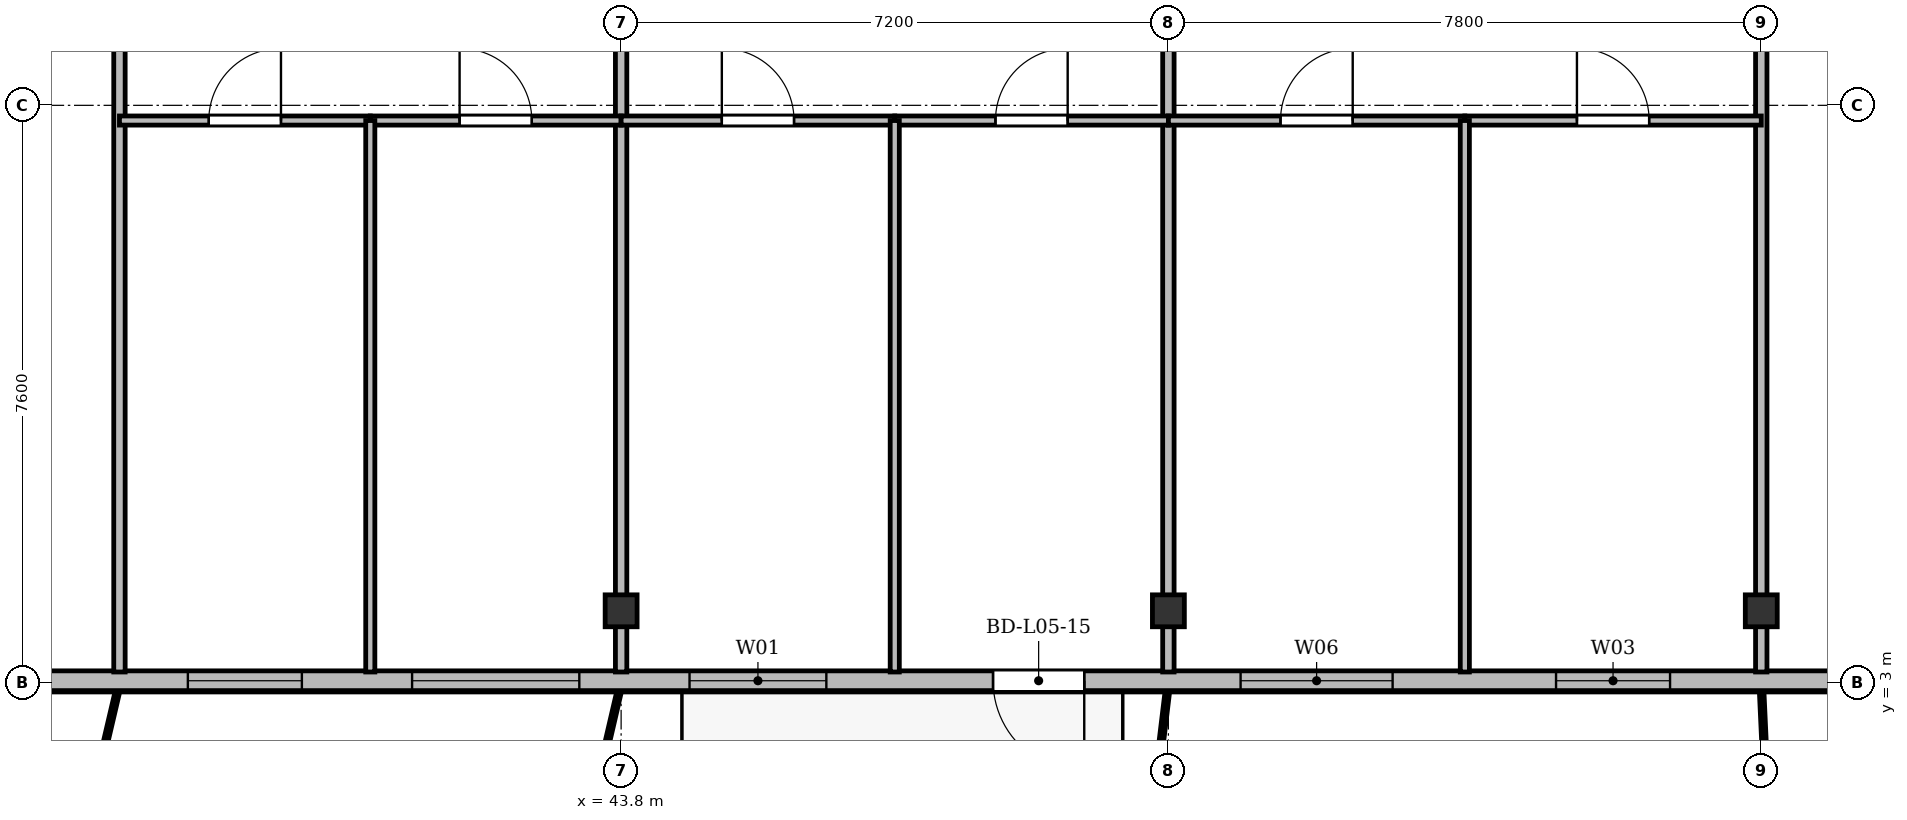
"""IFC4 building model, lengths in metres.
Left out: names, types, materials, properties, quantities, classifications, styles, units other than length and angle.
Written with IfcOpenShell. Run it as: python <this file> out.ifc"""

import sys

from ifc_helpers import new_model, si_unit, direction, frame, frame_2d, origin, origin_2d, place, context, subcontext, project, spatial, rectangle, i_section, extrude, source, transform, mapped, element, fill, save


model = new_model("IFC4")
c1 = context("Model", 3, precision=1e-05, world=origin(), true_north=direction((0.0, 1.0)))
c2 = subcontext(c1, "Body", "Model", "MODEL_VIEW")
j1 = project(units=[si_unit("LENGTHUNIT", "METRE"), si_unit("PLANEANGLEUNIT", "RADIAN")], contexts=[c1])
p1 = place(None, origin())
s1 = spatial("IfcSite", under=j1, at=p1, CompositionType="ELEMENT")
p2 = place(p1, origin())
s2 = spatial("IfcBuilding", under=s1, at=p2, CompositionType="ELEMENT")
p3 = place(p2, frame((0.0, 0.0, 23.5)))
s3 = spatial("IfcBuildingStorey", under=s2, at=p3, CompositionType="ELEMENT", Elevation=23.5)
m1 = source(origin(), c2, "Body", "SweptSolid", [
    extrude(i_section(OverallWidth=0.42, OverallDepth=0.42, WebThickness=0.026, FlangeThickness=0.04, at=origin_2d()), origin(), (0.0, 0.0, 1.0), 3.6),
])
for number, where, z_axis, x_axis in (
    (1, (43.8, 3.95, 0.0), (0.0, 0.0, 1.0), (1.0, 0.0, 0.0)),
    (2, (51.0, 3.95, 0.0), (0.0, 0.0, 1.0), (1.0, 0.0, 0.0)),
    (3, (58.8, 3.95, 0.0), (0.0, 0.0, 1.0), (1.0, 0.0, 0.0)),
):
    element("IfcColumn", number, at=place(p3, frame(where, z_axis=z_axis, x_axis=x_axis)), inside=s3, PredefinedType="COLUMN", context=c2, shape_type="MappedRepresentation", body=[
        mapped(m1, transform((0.0, 0.0, 0.0), x_axis=(1.0, 0.0, 0.0), y_axis=(0.0, 1.0, 0.0), z_axis=(0.0, 0.0, 1.0), scale=1.0)),
    ])
p4 = place(p3, frame((66.9, 3.03, 0.0), z_axis=(0.0, 0.0, 1.0), x_axis=(-1.0, 0.0, 0.0)))
e4 = element("IfcWall", 4, at=p4, inside=s3, PredefinedType="SOLIDWALL", context=c2, shape_type="SweptSolid", body=[
    extrude(rectangle(XDim=59.4, YDim=0.26, at=frame_2d((29.7, 0.0))), origin(), (0.0, 0.0, 1.0), 3.34),
])
p5 = place(p4, frame((3.6, 0.0, 0.9)))
e5 = element("IfcOpeningElement", 5, at=p5, cuts=e4, PredefinedType="OPENING", context=c2, shape_type="SweptSolid", body=[
    extrude(rectangle(XDim=2.2, YDim=1.8, at=frame_2d((1.1, 0.9))), frame((0.0, 0.14, 0.0), z_axis=(0.0, -1.0, 0.0), x_axis=(1.0, 0.0, 0.0)), (0.0, 0.0, 1.0), 0.28),
])
p6 = place(p4, frame((9.3, 0.0, 0.9)))
e6 = element("IfcOpeningElement", 6, at=p6, cuts=e4, PredefinedType="OPENING", context=c2, shape_type="SweptSolid", body=[
    extrude(rectangle(XDim=1.5, YDim=1.75, at=frame_2d((0.75, 0.875))), frame((0.0, 0.14, 0.0), z_axis=(0.0, -1.0, 0.0), x_axis=(1.0, 0.0, 0.0)), (0.0, 0.0, 1.0), 0.28),
])
p7 = place(p4, frame((12.95, 0.0, 0.9)))
e7 = element("IfcOpeningElement", 7, at=p7, cuts=e4, PredefinedType="OPENING", context=c2, shape_type="SweptSolid", body=[
    extrude(rectangle(XDim=2.0, YDim=1.95, at=frame_2d((1.0, 0.975))), frame((0.0, 0.14, 0.0), z_axis=(0.0, -1.0, 0.0), x_axis=(1.0, 0.0, 0.0)), (0.0, 0.0, 1.0), 0.28),
])
p8 = place(p4, frame((17.007, 0.0, 0.0)))
e8 = element("IfcOpeningElement", 8, at=p8, cuts=e4, PredefinedType="OPENING", context=c2, shape_type="SweptSolid", body=[
    extrude(rectangle(XDim=1.2, YDim=2.2, at=frame_2d((0.6, 1.1))), frame((0.0, 0.14, 0.0), z_axis=(0.0, -1.0, 0.0), x_axis=(1.0, 0.0, 0.0)), (0.0, 0.0, 1.0), 0.28),
])
p9 = place(p4, frame((20.4, 0.0, 0.9)))
e9 = element("IfcOpeningElement", 9, at=p9, cuts=e4, PredefinedType="OPENING", context=c2, shape_type="SweptSolid", body=[
    extrude(rectangle(XDim=1.8, YDim=1.8, at=frame_2d((0.9, 0.9))), frame((0.0, 0.14, 0.0), z_axis=(0.0, -1.0, 0.0), x_axis=(1.0, 0.0, 0.0)), (0.0, 0.0, 1.0), 0.28),
])
p10 = place(p4, frame((23.65, 0.0, 0.9)))
e10 = element("IfcOpeningElement", 10, at=p10, cuts=e4, PredefinedType="OPENING", context=c2, shape_type="SweptSolid", body=[
    extrude(rectangle(XDim=2.2, YDim=1.8, at=frame_2d((1.1, 0.9))), frame((0.0, 0.14, 0.0), z_axis=(0.0, -1.0, 0.0), x_axis=(1.0, 0.0, 0.0)), (0.0, 0.0, 1.0), 0.28),
])
p11 = place(p4, frame((27.3, 0.0, 0.9)))
e11 = element("IfcOpeningElement", 11, at=p11, cuts=e4, PredefinedType="OPENING", context=c2, shape_type="SweptSolid", body=[
    extrude(rectangle(XDim=1.5, YDim=1.75, at=frame_2d((0.75, 0.875))), frame((0.0, 0.14, 0.0), z_axis=(0.0, -1.0, 0.0), x_axis=(1.0, 0.0, 0.0)), (0.0, 0.0, 1.0), 0.28),
])
p12 = place(p4, frame((32.0, 0.0, 0.9)))
e12 = element("IfcOpeningElement", 12, at=p12, cuts=e4, PredefinedType="OPENING", context=c2, shape_type="SweptSolid", body=[
    extrude(rectangle(XDim=2.0, YDim=1.95, at=frame_2d((1.0, 0.975))), frame((0.0, 0.14, 0.0), z_axis=(0.0, -1.0, 0.0), x_axis=(1.0, 0.0, 0.0)), (0.0, 0.0, 1.0), 0.28),
])
p13 = place(p4, frame((36.675, 0.0, 0.9)))
e13 = element("IfcOpeningElement", 13, at=p13, cuts=e4, PredefinedType="OPENING", context=c2, shape_type="SweptSolid", body=[
    extrude(rectangle(XDim=1.65, YDim=1.85, at=frame_2d((0.825, 0.925))), frame((0.0, 0.14, 0.0), z_axis=(0.0, -1.0, 0.0), x_axis=(1.0, 0.0, 0.0)), (0.0, 0.0, 1.0), 0.28),
])
p14 = place(p4, frame((39.0, 0.0, 0.9)))
e14 = element("IfcOpeningElement", 14, at=p14, cuts=e4, PredefinedType="OPENING", context=c2, shape_type="SweptSolid", body=[
    extrude(rectangle(XDim=1.8, YDim=1.8, at=frame_2d((0.9, 0.9))), frame((0.0, 0.14, 0.0), z_axis=(0.0, -1.0, 0.0), x_axis=(1.0, 0.0, 0.0)), (0.0, 0.0, 1.0), 0.28),
])
p15 = place(p4, frame((41.55, 0.0, 0.9)))
e15 = element("IfcOpeningElement", 15, at=p15, cuts=e4, PredefinedType="OPENING", context=c2, shape_type="SweptSolid", body=[
    extrude(rectangle(XDim=1.5, YDim=1.75, at=frame_2d((0.75, 0.875))), frame((0.0, 0.14, 0.0), z_axis=(0.0, -1.0, 0.0), x_axis=(1.0, 0.0, 0.0)), (0.0, 0.0, 1.0), 0.28),
])
p16 = place(p4, frame((45.435, 0.0, 0.0)))
e16 = element("IfcOpeningElement", 16, at=p16, cuts=e4, PredefinedType="OPENING", context=c2, shape_type="SweptSolid", body=[
    extrude(rectangle(XDim=1.2, YDim=2.2, at=frame_2d((0.6, 1.1))), frame((0.0, 0.14, 0.0), z_axis=(0.0, -1.0, 0.0), x_axis=(1.0, 0.0, 0.0)), (0.0, 0.0, 1.0), 0.28),
])
p17 = place(p4, frame((48.35, 0.0, 0.9)))
e17 = element("IfcOpeningElement", 17, at=p17, cuts=e4, PredefinedType="OPENING", context=c2, shape_type="SweptSolid", body=[
    extrude(rectangle(XDim=2.0, YDim=1.95, at=frame_2d((1.0, 0.975))), frame((0.0, 0.14, 0.0), z_axis=(0.0, -1.0, 0.0), x_axis=(1.0, 0.0, 0.0)), (0.0, 0.0, 1.0), 0.28),
])
p18 = place(p4, frame((52.175, 0.0, 0.9)))
e18 = element("IfcOpeningElement", 18, at=p18, cuts=e4, PredefinedType="OPENING", context=c2, shape_type="SweptSolid", body=[
    extrude(rectangle(XDim=1.65, YDim=1.85, at=frame_2d((0.825, 0.925))), frame((0.0, 0.14, 0.0), z_axis=(0.0, -1.0, 0.0), x_axis=(1.0, 0.0, 0.0)), (0.0, 0.0, 1.0), 0.28),
])
p19 = place(p4, frame((55.5, 0.0, 0.9)))
e19 = element("IfcOpeningElement", 19, at=p19, cuts=e4, PredefinedType="OPENING", context=c2, shape_type="SweptSolid", body=[
    extrude(rectangle(XDim=1.8, YDim=1.8, at=frame_2d((0.9, 0.9))), frame((0.0, 0.14, 0.0), z_axis=(0.0, -1.0, 0.0), x_axis=(1.0, 0.0, 0.0)), (0.0, 0.0, 1.0), 0.28),
])
p20 = place(p3, frame((37.2, 3.145, 0.0), z_axis=(0.0, 0.0, 1.0), x_axis=(0.0, 1.0, 0.0)))
e20 = element("IfcWall", 20, at=p20, inside=s3, PredefinedType="PARTITIONING", context=c2, shape_type="SweptSolid", body=[
    extrude(rectangle(XDim=24.455, YDim=0.15, at=frame_2d((12.228, 0.0))), origin(), (0.0, 0.0, 1.0), 2.69),
])
for number, where, z_axis, x_axis in (
    (21, (43.8, 3.145, 0.0), (0.0, 0.0, 1.0), (0.0, 1.0, 0.0)),
    (22, (51.0, 3.145, 0.0), (0.0, 0.0, 1.0), (0.0, 1.0, 0.0)),
    (23, (58.8, 3.145, 0.0), (0.0, 0.0, 1.0), (0.0, 1.0, 0.0)),
):
    element("IfcWall", number, at=place(p3, frame(where, z_axis=z_axis, x_axis=x_axis)), inside=s3, PredefinedType="PARTITIONING", context=c2, shape_type="SweptSolid", body=[
        extrude(rectangle(XDim=24.455, YDim=0.15, at=frame_2d((12.228, 0.0))), origin(), (0.0, 0.0, 1.0), 2.752),
    ])
p21 = place(p3, frame((37.2, 10.4, 0.0), z_axis=(0.0, 0.0, 1.0), x_axis=(1.0, 0.0, 0.0)))
e24 = element("IfcWall", 24, at=p21, inside=s3, PredefinedType="PARTITIONING", context=c2, shape_type="SweptSolid", body=[
    extrude(rectangle(XDim=3.3, YDim=0.12, at=frame_2d((1.65, 0.0))), origin(), (0.0, 0.0, 1.0), 3.34),
])
p22 = place(p21, frame((1.175, 0.0, 0.0)))
e25 = element("IfcOpeningElement", 25, at=p22, cuts=e24, PredefinedType="OPENING", context=c2, shape_type="SweptSolid", body=[
    extrude(rectangle(XDim=0.95, YDim=2.15, at=frame_2d((0.475, 1.075))), frame((0.0, 0.07, 0.0), z_axis=(0.0, -1.0, 0.0), x_axis=(1.0, 0.0, 0.0)), (0.0, 0.0, 1.0), 0.14),
])
p23 = place(p3, frame((40.5, 10.4, 0.0), z_axis=(0.0, 0.0, 1.0), x_axis=(1.0, 0.0, 0.0)))
e26 = element("IfcWall", 26, at=p23, inside=s3, PredefinedType="PARTITIONING", context=c2, shape_type="SweptSolid", body=[
    extrude(rectangle(XDim=3.3, YDim=0.12, at=frame_2d((1.65, 0.0))), origin(), (0.0, 0.0, 1.0), 2.752),
])
p24 = place(p23, frame((1.175, 0.0, 0.0)))
e27 = element("IfcOpeningElement", 27, at=p24, cuts=e26, PredefinedType="OPENING", context=c2, shape_type="SweptSolid", body=[
    extrude(rectangle(XDim=0.95, YDim=2.15, at=frame_2d((0.475, 1.075))), frame((0.0, 0.07, 0.0), z_axis=(0.0, -1.0, 0.0), x_axis=(1.0, 0.0, 0.0)), (0.0, 0.0, 1.0), 0.14),
])
p25 = place(p3, frame((40.5, 3.145, 0.0), z_axis=(0.0, 0.0, 1.0), x_axis=(0.0, 1.0, 0.0)))
e28 = element("IfcWall", 28, at=p25, inside=s3, PredefinedType="PARTITIONING", context=c2, shape_type="SweptSolid", body=[
    extrude(rectangle(XDim=7.255, YDim=0.12, at=frame_2d((3.627, 0.0))), origin(), (0.0, 0.0, 1.0), 2.69),
])
p26 = place(p3, frame((43.8, 10.4, 0.0), z_axis=(0.0, 0.0, 1.0), x_axis=(1.0, 0.0, 0.0)))
e29 = element("IfcWall", 29, at=p26, inside=s3, PredefinedType="PARTITIONING", context=c2, shape_type="SweptSolid", body=[
    extrude(rectangle(XDim=3.6, YDim=0.12, at=frame_2d((1.8, 0.0))), origin(), (0.0, 0.0, 1.0), 2.752),
])
p27 = place(p26, frame((1.325, 0.0, 0.0)))
e30 = element("IfcOpeningElement", 30, at=p27, cuts=e29, PredefinedType="OPENING", context=c2, shape_type="SweptSolid", body=[
    extrude(rectangle(XDim=0.95, YDim=2.15, at=frame_2d((0.475, 1.075))), frame((0.0, 0.07, 0.0), z_axis=(0.0, -1.0, 0.0), x_axis=(1.0, 0.0, 0.0)), (0.0, 0.0, 1.0), 0.14),
])
p28 = place(p3, frame((47.4, 10.4, 0.0), z_axis=(0.0, 0.0, 1.0), x_axis=(1.0, 0.0, 0.0)))
e31 = element("IfcWall", 31, at=p28, inside=s3, PredefinedType="PARTITIONING", context=c2, shape_type="SweptSolid", body=[
    extrude(rectangle(XDim=3.6, YDim=0.12, at=frame_2d((1.8, 0.0))), origin(), (0.0, 0.0, 1.0), 2.752),
])
p29 = place(p28, frame((1.325, 0.0, 0.0)))
e32 = element("IfcOpeningElement", 32, at=p29, cuts=e31, PredefinedType="OPENING", context=c2, shape_type="SweptSolid", body=[
    extrude(rectangle(XDim=0.95, YDim=2.15, at=frame_2d((0.475, 1.075))), frame((0.0, 0.07, 0.0), z_axis=(0.0, -1.0, 0.0), x_axis=(1.0, 0.0, 0.0)), (0.0, 0.0, 1.0), 0.14),
])
p30 = place(p3, frame((47.4, 3.145, 0.0), z_axis=(0.0, 0.0, 1.0), x_axis=(0.0, 1.0, 0.0)))
e33 = element("IfcWall", 33, at=p30, inside=s3, PredefinedType="PARTITIONING", context=c2, shape_type="SweptSolid", body=[
    extrude(rectangle(XDim=7.255, YDim=0.12, at=frame_2d((3.627, 0.0))), origin(), (0.0, 0.0, 1.0), 2.69),
])
p31 = place(p3, frame((51.0, 10.4, 0.0), z_axis=(0.0, 0.0, 1.0), x_axis=(1.0, 0.0, 0.0)))
e34 = element("IfcWall", 34, at=p31, inside=s3, PredefinedType="PARTITIONING", context=c2, shape_type="SweptSolid", body=[
    extrude(rectangle(XDim=3.9, YDim=0.12, at=frame_2d((1.95, 0.0))), origin(), (0.0, 0.0, 1.0), 2.752),
])
p32 = place(p31, frame((1.475, 0.0, 0.0)))
e35 = element("IfcOpeningElement", 35, at=p32, cuts=e34, PredefinedType="OPENING", context=c2, shape_type="SweptSolid", body=[
    extrude(rectangle(XDim=0.95, YDim=2.15, at=frame_2d((0.475, 1.075))), frame((0.0, 0.07, 0.0), z_axis=(0.0, -1.0, 0.0), x_axis=(1.0, 0.0, 0.0)), (0.0, 0.0, 1.0), 0.14),
])
p33 = place(p3, frame((54.9, 10.4, 0.0), z_axis=(0.0, 0.0, 1.0), x_axis=(1.0, 0.0, 0.0)))
e36 = element("IfcWall", 36, at=p33, inside=s3, PredefinedType="PARTITIONING", context=c2, shape_type="SweptSolid", body=[
    extrude(rectangle(XDim=3.9, YDim=0.12, at=frame_2d((1.95, 0.0))), origin(), (0.0, 0.0, 1.0), 2.752),
])
p34 = place(p33, frame((1.475, 0.0, 0.0)))
e37 = element("IfcOpeningElement", 37, at=p34, cuts=e36, PredefinedType="OPENING", context=c2, shape_type="SweptSolid", body=[
    extrude(rectangle(XDim=0.95, YDim=2.15, at=frame_2d((0.475, 1.075))), frame((0.0, 0.07, 0.0), z_axis=(0.0, -1.0, 0.0), x_axis=(1.0, 0.0, 0.0)), (0.0, 0.0, 1.0), 0.14),
])
p35 = place(p3, frame((54.9, 3.145, 0.0), z_axis=(0.0, 0.0, 1.0), x_axis=(0.0, 1.0, 0.0)))
e38 = element("IfcWall", 38, at=p35, inside=s3, PredefinedType="PARTITIONING", context=c2, shape_type="SweptSolid", body=[
    extrude(rectangle(XDim=7.255, YDim=0.12, at=frame_2d((3.627, 0.0))), origin(), (0.0, 0.0, 1.0), 2.69),
])
m2 = source(origin(), c2, "Body", "SweptSolid", [
    extrude(rectangle(XDim=1.5, YDim=1.75, at=frame_2d((0.75, 0.875))), frame((0.0, 0.03, 0.0), z_axis=(0.0, -1.0, 0.0), x_axis=(1.0, 0.0, 0.0)), (0.0, 0.0, 1.0), 0.06),
])
p36 = place(p6, origin())
e39 = element("IfcWindow", 39, at=p36, inside=s3, PartitioningType="SINGLE_PANEL", PredefinedType="WINDOW", context=c2, shape_type="MappedRepresentation", body=[
    mapped(m2, transform((0.0, 0.0, 0.0), x_axis=(1.0, 0.0, 0.0), y_axis=(0.0, 1.0, 0.0), z_axis=(0.0, 0.0, 1.0), scale=1.0)),
])
fill(e6, e39)
m3 = source(origin(), c2, "Body", "SweptSolid", [
    extrude(rectangle(XDim=2.0, YDim=1.95, at=frame_2d((1.0, 0.975))), frame((0.0, 0.03, 0.0), z_axis=(0.0, -1.0, 0.0), x_axis=(1.0, 0.0, 0.0)), (0.0, 0.0, 1.0), 0.06),
])
p37 = place(p7, origin())
e40 = element("IfcWindow", 40, at=p37, inside=s3, PartitioningType="SINGLE_PANEL", PredefinedType="WINDOW", context=c2, shape_type="MappedRepresentation", body=[
    mapped(m3, transform((0.0, 0.0, 0.0), x_axis=(1.0, 0.0, 0.0), y_axis=(0.0, 1.0, 0.0), z_axis=(0.0, 0.0, 1.0), scale=1.0)),
])
fill(e7, e40)
m4 = source(origin(), c2, "Body", "SweptSolid", [
    extrude(rectangle(XDim=1.2, YDim=2.2, at=frame_2d((0.6, 1.1))), frame((0.0, 0.025, 0.0), z_axis=(0.0, -1.0, 0.0), x_axis=(1.0, 0.0, 0.0)), (0.0, 0.0, 1.0), 0.05),
])
p38 = place(p8, origin())
e41 = element("IfcDoor", 41, at=p38, inside=s3, OperationType="SINGLE_SWING_LEFT", PredefinedType="DOOR", context=c2, shape_type="MappedRepresentation", body=[
    mapped(m4, transform((0.0, 0.0, 0.0), x_axis=(1.0, 0.0, 0.0), y_axis=(0.0, 1.0, 0.0), z_axis=(0.0, 0.0, 1.0), scale=1.0)),
])
fill(e8, e41)
m5 = source(origin(), c2, "Body", "SweptSolid", [
    extrude(rectangle(XDim=1.8, YDim=1.8, at=frame_2d((0.9, 0.9))), frame((0.0, 0.03, 0.0), z_axis=(0.0, -1.0, 0.0), x_axis=(1.0, 0.0, 0.0)), (0.0, 0.0, 1.0), 0.06),
])
p39 = place(p9, origin())
e42 = element("IfcWindow", 42, at=p39, inside=s3, PartitioningType="SINGLE_PANEL", PredefinedType="WINDOW", context=c2, shape_type="MappedRepresentation", body=[
    mapped(m5, transform((0.0, 0.0, 0.0), x_axis=(1.0, 0.0, 0.0), y_axis=(0.0, 1.0, 0.0), z_axis=(0.0, 0.0, 1.0), scale=1.0)),
])
fill(e9, e42)
m6 = source(origin(), c2, "Body", "SweptSolid", [
    extrude(rectangle(XDim=2.2, YDim=1.8, at=frame_2d((1.1, 0.9))), frame((0.0, 0.03, 0.0), z_axis=(0.0, -1.0, 0.0), x_axis=(1.0, 0.0, 0.0)), (0.0, 0.0, 1.0), 0.06),
])
p40 = place(p10, origin())
e43 = element("IfcWindow", 43, at=p40, inside=s3, PartitioningType="SINGLE_PANEL", PredefinedType="WINDOW", context=c2, shape_type="MappedRepresentation", body=[
    mapped(m6, transform((0.0, 0.0, 0.0), x_axis=(1.0, 0.0, 0.0), y_axis=(0.0, 1.0, 0.0), z_axis=(0.0, 0.0, 1.0), scale=1.0)),
])
fill(e10, e43)
p41 = place(p11, origin())
e44 = element("IfcWindow", 44, at=p41, inside=s3, PartitioningType="SINGLE_PANEL", PredefinedType="WINDOW", context=c2, shape_type="MappedRepresentation", body=[
    mapped(m2, transform((0.0, 0.0, 0.0), x_axis=(1.0, 0.0, 0.0), y_axis=(0.0, 1.0, 0.0), z_axis=(0.0, 0.0, 1.0), scale=1.0)),
])
fill(e11, e44)
m7 = source(origin(), c2, "Body", "SweptSolid", [
    extrude(rectangle(XDim=0.95, YDim=2.15, at=frame_2d((0.475, 1.075))), frame((0.0, 0.025, 0.0), z_axis=(0.0, -1.0, 0.0), x_axis=(1.0, 0.0, 0.0)), (0.0, 0.0, 1.0), 0.05),
])
p42 = place(p22, origin())
e45 = element("IfcDoor", 45, at=p42, inside=s3, OperationType="SINGLE_SWING_RIGHT", PredefinedType="DOOR", context=c2, shape_type="MappedRepresentation", body=[
    mapped(m7, transform((0.0, 0.0, 0.0), x_axis=(1.0, 0.0, 0.0), y_axis=(0.0, 1.0, 0.0), z_axis=(0.0, 0.0, 1.0), scale=1.0)),
])
fill(e25, e45)
p43 = place(p24, origin())
e46 = element("IfcDoor", 46, at=p43, inside=s3, OperationType="SINGLE_SWING_LEFT", PredefinedType="DOOR", context=c2, shape_type="MappedRepresentation", body=[
    mapped(m7, transform((0.0, 0.0, 0.0), x_axis=(1.0, 0.0, 0.0), y_axis=(0.0, 1.0, 0.0), z_axis=(0.0, 0.0, 1.0), scale=1.0)),
])
fill(e27, e46)
p44 = place(p27, origin())
e47 = element("IfcDoor", 47, at=p44, inside=s3, OperationType="SINGLE_SWING_LEFT", PredefinedType="DOOR", context=c2, shape_type="MappedRepresentation", body=[
    mapped(m7, transform((0.0, 0.0, 0.0), x_axis=(1.0, 0.0, 0.0), y_axis=(0.0, 1.0, 0.0), z_axis=(0.0, 0.0, 1.0), scale=1.0)),
])
fill(e30, e47)
p45 = place(p29, origin())
e48 = element("IfcDoor", 48, at=p45, inside=s3, OperationType="SINGLE_SWING_RIGHT", PredefinedType="DOOR", context=c2, shape_type="MappedRepresentation", body=[
    mapped(m7, transform((0.0, 0.0, 0.0), x_axis=(1.0, 0.0, 0.0), y_axis=(0.0, 1.0, 0.0), z_axis=(0.0, 0.0, 1.0), scale=1.0)),
])
fill(e32, e48)
p46 = place(p32, origin())
e49 = element("IfcDoor", 49, at=p46, inside=s3, OperationType="SINGLE_SWING_RIGHT", PredefinedType="DOOR", context=c2, shape_type="MappedRepresentation", body=[
    mapped(m7, transform((0.0, 0.0, 0.0), x_axis=(1.0, 0.0, 0.0), y_axis=(0.0, 1.0, 0.0), z_axis=(0.0, 0.0, 1.0), scale=1.0)),
])
fill(e35, e49)
p47 = place(p34, origin())
e50 = element("IfcDoor", 50, at=p47, inside=s3, OperationType="SINGLE_SWING_LEFT", PredefinedType="DOOR", context=c2, shape_type="MappedRepresentation", body=[
    mapped(m7, transform((0.0, 0.0, 0.0), x_axis=(1.0, 0.0, 0.0), y_axis=(0.0, 1.0, 0.0), z_axis=(0.0, 0.0, 1.0), scale=1.0)),
])
fill(e37, e50)
save(model, sys.argv[1])
